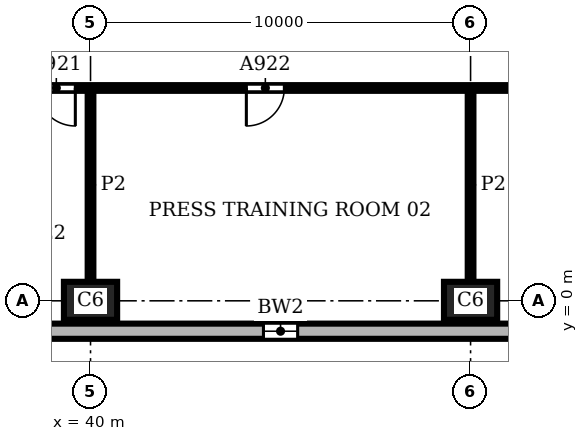
"""IFC4 building model, lengths in metres.
Left out: names, types, materials, properties, quantities, classifications, styles, units other than length and angle.
Written with IfcOpenShell. Run it as: python <this file> out.ifc"""

import sys

from ifc_helpers import new_model, si_unit, direction, frame, frame_2d, origin, origin_2d, place, context, subcontext, project, spatial, rectangle, extrude, element, fill, save


model = new_model("IFC4")
c1 = context("Model", 3, precision=1e-05, world=origin(), true_north=direction((0.0, 1.0)))
c2 = subcontext(c1, "Body", "Model", "MODEL_VIEW")
j1 = project(units=[si_unit("LENGTHUNIT", "METRE"), si_unit("PLANEANGLEUNIT", "RADIAN")], contexts=[c1])
p1 = place(None, origin())
s1 = spatial("IfcSite", under=j1, at=p1, CompositionType="ELEMENT")
p2 = place(p1, origin())
s2 = spatial("IfcBuilding", under=s1, at=p2, CompositionType="ELEMENT")
p3 = place(p2, frame((0.0, 0.0, 113.4)))
s3 = spatial("IfcBuildingStorey", under=s2, at=p3, CompositionType="ELEMENT", Elevation=113.4)
for number, where, z_axis, x_axis in (
    (1, (40.0, 0.0, 0.0), (0.0, 0.0, 1.0), (1.0, 0.0, 0.0)),
    (2, (50.0, 0.0, 0.0), (0.0, 0.0, 1.0), (1.0, 0.0, 0.0)),
):
    element("IfcColumn", number, at=place(p3, frame(where, z_axis=z_axis, x_axis=x_axis)), inside=s3, PredefinedType="COLUMN", context=c2, shape_type="SweptSolid", body=[
        extrude(rectangle(XDim=1.4, YDim=1.0, at=origin_2d()), origin(), (0.0, 0.0, 1.0), 3.9),
    ])
p4 = place(p3, frame((20.8, -0.8, 0.0), z_axis=(0.0, 0.0, 1.0), x_axis=(1.0, 0.0, 0.0)))
e3 = element("IfcWall", 3, at=p4, inside=s3, PredefinedType="SOLIDWALL", context=c2, shape_type="SweptSolid", body=[
    extrude(rectangle(XDim=48.4, YDim=0.4, at=frame_2d((24.2, 0.0))), origin(), (0.0, 0.0, 1.0), 3.9),
])
p5 = place(p4, frame((3.75, 0.0, 0.9)))
e4 = element("IfcOpeningElement", 4, at=p5, cuts=e3, PredefinedType="OPENING", context=c2, shape_type="SweptSolid", body=[
    extrude(rectangle(XDim=0.9, YDim=2.35, at=frame_2d((0.45, 1.175))), frame((0.0, 0.21, 0.0), z_axis=(0.0, -1.0, 0.0), x_axis=(1.0, 0.0, 0.0)), (0.0, 0.0, 1.0), 0.42),
])
p6 = place(p4, frame((13.75, 0.0, 0.9)))
e5 = element("IfcOpeningElement", 5, at=p6, cuts=e3, PredefinedType="OPENING", context=c2, shape_type="SweptSolid", body=[
    extrude(rectangle(XDim=0.9, YDim=2.35, at=frame_2d((0.45, 1.175))), frame((0.0, 0.21, 0.0), z_axis=(0.0, -1.0, 0.0), x_axis=(1.0, 0.0, 0.0)), (0.0, 0.0, 1.0), 0.42),
])
p7 = place(p4, frame((23.75, 0.0, 0.9)))
e6 = element("IfcOpeningElement", 6, at=p7, cuts=e3, PredefinedType="OPENING", context=c2, shape_type="SweptSolid", body=[
    extrude(rectangle(XDim=0.9, YDim=2.35, at=frame_2d((0.45, 1.175))), frame((0.0, 0.21, 0.0), z_axis=(0.0, -1.0, 0.0), x_axis=(1.0, 0.0, 0.0)), (0.0, 0.0, 1.0), 0.42),
])
p8 = place(p4, frame((33.75, 0.0, 0.9)))
e7 = element("IfcOpeningElement", 7, at=p8, cuts=e3, PredefinedType="OPENING", context=c2, shape_type="SweptSolid", body=[
    extrude(rectangle(XDim=0.9, YDim=2.35, at=frame_2d((0.45, 1.175))), frame((0.0, 0.21, 0.0), z_axis=(0.0, -1.0, 0.0), x_axis=(1.0, 0.0, 0.0)), (0.0, 0.0, 1.0), 0.42),
])
p9 = place(p4, frame((43.75, 0.0, 0.9)))
e8 = element("IfcOpeningElement", 8, at=p9, cuts=e3, PredefinedType="OPENING", context=c2, shape_type="SweptSolid", body=[
    extrude(rectangle(XDim=0.9, YDim=2.35, at=frame_2d((0.45, 1.175))), frame((0.0, 0.21, 0.0), z_axis=(0.0, -1.0, 0.0), x_axis=(1.0, 0.0, 0.0)), (0.0, 0.0, 1.0), 0.42),
])
for number, where, z_axis, x_axis in (
    (9, (40.0, 0.5, 0.0), (0.0, 0.0, 1.0), (0.0, 1.0, 0.0)),
    (10, (50.0, 0.5, 0.0), (0.0, 0.0, 1.0), (0.0, 1.0, 0.0)),
):
    element("IfcWall", number, at=place(p3, frame(where, z_axis=z_axis, x_axis=x_axis)), inside=s3, PredefinedType="PARTITIONING", context=c2, shape_type="SweptSolid", body=[
        extrude(rectangle(XDim=5.1, YDim=0.15, at=frame_2d((2.55, 0.0))), origin(), (0.0, 0.0, 1.0), 3.45),
    ])
p10 = place(p3, frame((38.0, 5.6, 0.0), z_axis=(0.0, 0.0, 1.0), x_axis=(1.0, 0.0, 0.0)))
e11 = element("IfcWall", 11, at=p10, inside=s3, PredefinedType="PARTITIONING", context=c2, shape_type="SweptSolid", body=[
    extrude(rectangle(XDim=27.0, YDim=0.15, at=frame_2d((13.5, 0.0))), origin(), (0.0, 0.0, 1.0), 3.45),
])
p11 = place(p10, frame((0.6, 0.0, 0.0)))
e12 = element("IfcOpeningElement", 12, at=p11, cuts=e11, PredefinedType="OPENING", context=c2, shape_type="SweptSolid", body=[
    extrude(rectangle(XDim=1.0, YDim=2.1, at=frame_2d((0.5, 1.05))), frame((0.0, 0.085, 0.0), z_axis=(0.0, -1.0, 0.0), x_axis=(1.0, 0.0, 0.0)), (0.0, 0.0, 1.0), 0.17),
])
p12 = place(p10, frame((6.1, 0.0, 0.0)))
e13 = element("IfcOpeningElement", 13, at=p12, cuts=e11, PredefinedType="OPENING", context=c2, shape_type="SweptSolid", body=[
    extrude(rectangle(XDim=1.0, YDim=2.1, at=frame_2d((0.5, 1.05))), frame((0.0, 0.085, 0.0), z_axis=(0.0, -1.0, 0.0), x_axis=(1.0, 0.0, 0.0)), (0.0, 0.0, 1.0), 0.17),
])
p13 = place(p10, frame((15.85, 0.0, 0.0)))
e14 = element("IfcOpeningElement", 14, at=p13, cuts=e11, PredefinedType="OPENING", context=c2, shape_type="SweptSolid", body=[
    extrude(rectangle(XDim=1.0, YDim=2.1, at=frame_2d((0.5, 1.05))), frame((0.0, 0.085, 0.0), z_axis=(0.0, -1.0, 0.0), x_axis=(1.0, 0.0, 0.0)), (0.0, 0.0, 1.0), 0.17),
])
p14 = place(p7, origin())
e15 = element("IfcWindow", 15, at=p14, inside=s3, PartitioningType="SINGLE_PANEL", PredefinedType="WINDOW", context=c2, shape_type="SweptSolid", body=[
    extrude(rectangle(XDim=0.9, YDim=2.35, at=frame_2d((0.45, 1.175))), frame((0.0, 0.16, 0.0), z_axis=(0.0, -1.0, 0.0), x_axis=(1.0, 0.0, 0.0)), (0.0, 0.0, 1.0), 0.06),
])
fill(e6, e15)
p15 = place(p11, frame((1.0, 0.0, 0.0), z_axis=(0.0, 0.0, 1.0), x_axis=(-1.0, 0.0, 0.0)))
e16 = element("IfcDoor", 16, at=p15, inside=s3, OperationType="SINGLE_SWING_LEFT", PredefinedType="DOOR", context=c2, shape_type="SweptSolid", body=[
    extrude(rectangle(XDim=1.0, YDim=2.1, at=frame_2d((0.5, 1.05))), frame((0.0, 0.025, 0.0), z_axis=(0.0, -1.0, 0.0), x_axis=(1.0, 0.0, 0.0)), (0.0, 0.0, 1.0), 0.05),
])
fill(e12, e16)
p16 = place(p12, frame((1.0, 0.0, 0.0), z_axis=(0.0, 0.0, 1.0), x_axis=(-1.0, 0.0, 0.0)))
e17 = element("IfcDoor", 17, at=p16, inside=s3, OperationType="SINGLE_SWING_RIGHT", PredefinedType="DOOR", context=c2, shape_type="SweptSolid", body=[
    extrude(rectangle(XDim=1.0, YDim=2.1, at=frame_2d((0.5, 1.05))), frame((0.0, 0.025, 0.0), z_axis=(0.0, -1.0, 0.0), x_axis=(1.0, 0.0, 0.0)), (0.0, 0.0, 1.0), 0.05),
])
fill(e13, e17)
save(model, sys.argv[1])
